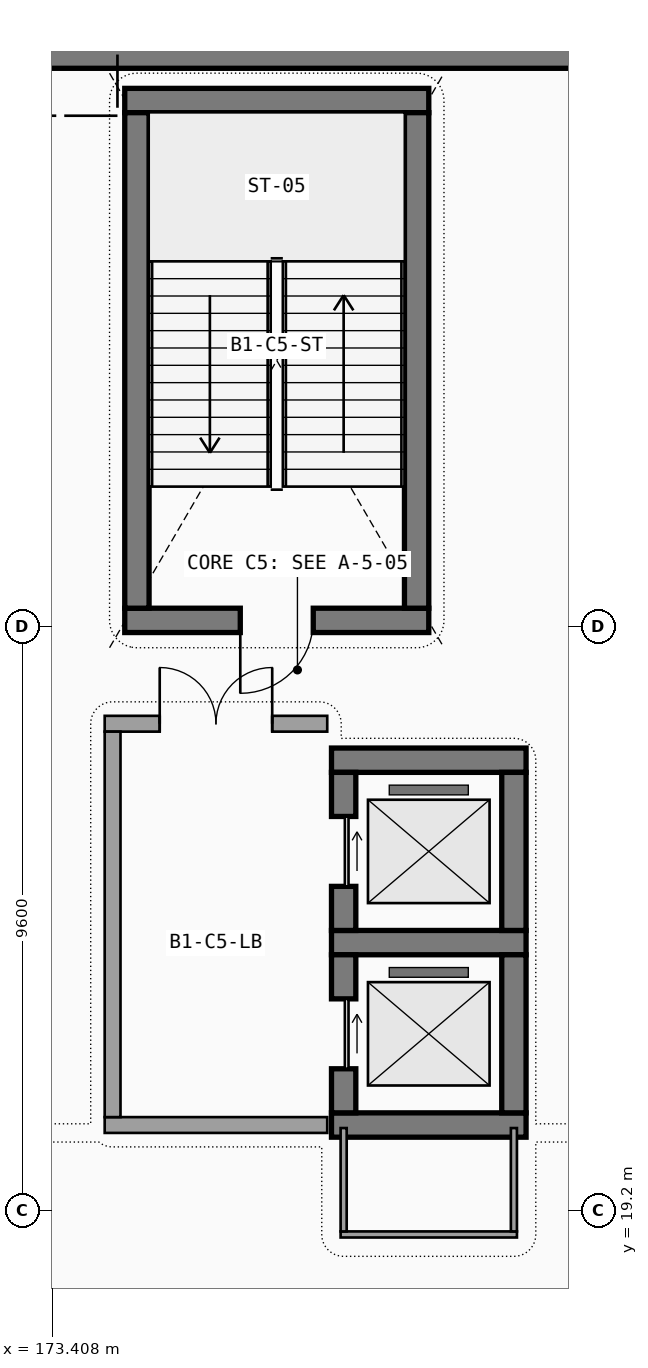
"""IFC4 building model, lengths in metres.
Left out: names, types, materials, properties, quantities, classifications, styles, units other than length and angle.
Written with IfcOpenShell. Run it as: python <this file> out.ifc"""

import sys

from ifc_helpers import new_model, si_unit, direction, frame, frame_2d, origin, place, context, subcontext, project, spatial, rectangle, extrude, element, fill, save


model = new_model("IFC4")
c1 = context("Model", 3, precision=1e-05, world=origin(), true_north=direction((0.0, 1.0)))
c2 = subcontext(c1, "Body", "Model", "MODEL_VIEW")
j1 = project(units=[si_unit("LENGTHUNIT", "METRE"), si_unit("PLANEANGLEUNIT", "RADIAN")], contexts=[c1])
p1 = place(None, origin())
s1 = spatial("IfcSite", under=j1, at=p1, CompositionType="ELEMENT")
p2 = place(p1, origin())
s2 = spatial("IfcBuilding", under=s1, at=p2, CompositionType="ELEMENT")
p3 = place(p2, frame((0.0, 0.0, -4.8)))
s3 = spatial("IfcBuildingStorey", under=s2, at=p3, CompositionType="ELEMENT", Elevation=-4.8)
p4 = place(p3, frame((182.4, 38.22, 0.0), z_axis=(0.0, 0.0, 1.0), x_axis=(-1.0, 0.0, 0.0)))
e1 = element("IfcWall", 1, at=p4, inside=s3, PredefinedType="USERDEFINED", context=c2, shape_type="SweptSolid", body=[
    extrude(rectangle(XDim=9.6, YDim=0.48, at=frame_2d((4.8, 0.0))), origin(), (0.0, 0.0, 1.0), 3.6),
])
p5 = place(p3, frame((174.6, 28.9, 0.0), z_axis=(0.0, 0.0, 1.0), x_axis=(1.0, 0.0, 0.0)))
e2 = element("IfcWall", 2, at=p5, inside=s3, PredefinedType="SHEAR", context=c2, shape_type="SweptSolid", body=[
    extrude(rectangle(XDim=5.0, YDim=0.4, at=frame_2d((2.5, 0.0))), origin(), (0.0, 0.0, 1.0), 4.5),
])
p6 = place(p5, frame((3.1, 0.0, 0.0), z_axis=(0.0, 0.0, 1.0), x_axis=(-1.0, 0.0, 0.0)))
e3 = element("IfcOpeningElement", 3, at=p6, cuts=e2, PredefinedType="OPENING", context=c2, shape_type="SweptSolid", body=[
    extrude(rectangle(XDim=1.2, YDim=2.2, at=frame_2d((0.6, 1.1))), frame((0.0, 0.21, 0.0), z_axis=(0.0, -1.0, 0.0), x_axis=(1.0, 0.0, 0.0)), (0.0, 0.0, 1.0), 0.42),
])
p7 = place(p3, frame((179.6, 37.45, 0.0), z_axis=(0.0, 0.0, 1.0), x_axis=(-1.0, 0.0, 0.0)))
e4 = element("IfcWall", 4, at=p7, inside=s3, PredefinedType="SHEAR", context=c2, shape_type="SweptSolid", body=[
    extrude(rectangle(XDim=5.0, YDim=0.4, at=frame_2d((2.5, 0.0))), origin(), (0.0, 0.0, 1.0), 4.5),
])
for number, where, z_axis, x_axis in (
    (5, (174.8, 37.25, 0.0), (0.0, 0.0, 1.0), (0.0, -1.0, 0.0)),
    (6, (179.4, 29.1, 0.0), (0.0, 0.0, 1.0), (0.0, 1.0, 0.0)),
):
    element("IfcWall", number, at=place(p3, frame(where, z_axis=z_axis, x_axis=x_axis)), inside=s3, PredefinedType="SHEAR", context=c2, shape_type="SweptSolid", body=[
        extrude(rectangle(XDim=8.15, YDim=0.4, at=frame_2d((4.075, 0.0))), origin(), (0.0, 0.0, 1.0), 4.5),
    ])
for number, where, z_axis, x_axis in (
    (7, (178.0, 20.6, 0.0), (0.0, 0.0, 1.0), (1.0, 0.0, 0.0)),
    (8, (181.2, 23.6, 0.0), (0.0, 0.0, 1.0), (-1.0, 0.0, 0.0)),
):
    element("IfcWall", number, at=place(p3, frame(where, z_axis=z_axis, x_axis=x_axis)), inside=s3, PredefinedType="SHEAR", context=c2, shape_type="SweptSolid", body=[
        extrude(rectangle(XDim=3.2, YDim=0.4, at=frame_2d((1.6, 0.0))), origin(), (0.0, 0.0, 1.0), 4.5),
    ])
p8 = place(p3, frame((178.2, 23.4, 0.0), z_axis=(0.0, 0.0, 1.0), x_axis=(0.0, -1.0, 0.0)))
e9 = element("IfcWall", 9, at=p8, inside=s3, PredefinedType="SHEAR", context=c2, shape_type="SweptSolid", body=[
    extrude(rectangle(XDim=2.6, YDim=0.4, at=frame_2d((1.3, 0.0))), origin(), (0.0, 0.0, 1.0), 4.5),
])
p9 = place(p8, frame((0.725, 0.0, 0.0), z_axis=(0.0, 0.0, 1.0), x_axis=(1.0, 0.0, 0.0)))
e10 = element("IfcOpeningElement", 10, at=p9, cuts=e9, PredefinedType="OPENING", context=c2, shape_type="SweptSolid", body=[
    extrude(rectangle(XDim=1.15, YDim=2.2, at=frame_2d((0.575, 1.1))), frame((0.0, 0.21, 0.0), z_axis=(0.0, -1.0, 0.0), x_axis=(1.0, 0.0, 0.0)), (0.0, 0.0, 1.0), 0.42),
])
p10 = place(p3, frame((181.0, 20.8, 0.0), z_axis=(0.0, 0.0, 1.0), x_axis=(0.0, 1.0, 0.0)))
e11 = element("IfcWall", 11, at=p10, inside=s3, PredefinedType="SHEAR", context=c2, shape_type="SweptSolid", body=[
    extrude(rectangle(XDim=2.6, YDim=0.4, at=frame_2d((1.3, 0.0))), origin(), (0.0, 0.0, 1.0), 4.5),
])
p11 = place(p3, frame((181.2, 26.6, 0.0), z_axis=(0.0, 0.0, 1.0), x_axis=(-1.0, 0.0, 0.0)))
e12 = element("IfcWall", 12, at=p11, inside=s3, PredefinedType="SHEAR", context=c2, shape_type="SweptSolid", body=[
    extrude(rectangle(XDim=3.2, YDim=0.4, at=frame_2d((1.6, 0.0))), origin(), (0.0, 0.0, 1.0), 4.5),
])
p12 = place(p3, frame((178.2, 26.4, 0.0), z_axis=(0.0, 0.0, 1.0), x_axis=(0.0, -1.0, 0.0)))
e13 = element("IfcWall", 13, at=p12, inside=s3, PredefinedType="SHEAR", context=c2, shape_type="SweptSolid", body=[
    extrude(rectangle(XDim=2.6, YDim=0.4, at=frame_2d((1.3, 0.0))), origin(), (0.0, 0.0, 1.0), 4.5),
])
p13 = place(p12, frame((0.725, 0.0, 0.0), z_axis=(0.0, 0.0, 1.0), x_axis=(1.0, 0.0, 0.0)))
e14 = element("IfcOpeningElement", 14, at=p13, cuts=e13, PredefinedType="OPENING", context=c2, shape_type="SweptSolid", body=[
    extrude(rectangle(XDim=1.15, YDim=2.2, at=frame_2d((0.575, 1.1))), frame((0.0, 0.21, 0.0), z_axis=(0.0, -1.0, 0.0), x_axis=(1.0, 0.0, 0.0)), (0.0, 0.0, 1.0), 0.42),
])
p14 = place(p3, frame((181.0, 23.8, 0.0), z_axis=(0.0, 0.0, 1.0), x_axis=(0.0, 1.0, 0.0)))
e15 = element("IfcWall", 15, at=p14, inside=s3, PredefinedType="SHEAR", context=c2, shape_type="SweptSolid", body=[
    extrude(rectangle(XDim=2.6, YDim=0.4, at=frame_2d((1.3, 0.0))), origin(), (0.0, 0.0, 1.0), 4.5),
])
p15 = place(p3, frame((178.15, 18.8, 0.0), z_axis=(0.0, 0.0, 1.0), x_axis=(1.0, 0.0, 0.0)))
e16 = element("IfcWall", 16, at=p15, inside=s3, PredefinedType="PARTITIONING", context=c2, shape_type="SweptSolid", body=[
    extrude(rectangle(XDim=2.9, YDim=0.1, at=frame_2d((1.45, 0.0))), origin(), (0.0, 0.0, 1.0), 4.5),
])
for number, where, z_axis, x_axis in (
    (17, (178.2, 20.55, 0.0), (0.0, 0.0, 1.0), (0.0, -1.0, 0.0)),
    (18, (181.0, 18.85, 0.0), (0.0, 0.0, 1.0), (0.0, 1.0, 0.0)),
):
    element("IfcWall", number, at=place(p3, frame(where, z_axis=z_axis, x_axis=x_axis)), inside=s3, PredefinedType="PARTITIONING", context=c2, shape_type="SweptSolid", body=[
        extrude(rectangle(XDim=1.7, YDim=0.1, at=frame_2d((0.85, 0.0))), origin(), (0.0, 0.0, 1.0), 4.5),
    ])
p16 = place(p3, frame((174.27, 20.6, 0.0), z_axis=(0.0, 0.0, 1.0), x_axis=(1.0, 0.0, 0.0)))
e19 = element("IfcWall", 19, at=p16, inside=s3, PredefinedType="SOLIDWALL", context=c2, shape_type="SweptSolid", body=[
    extrude(rectangle(XDim=3.66, YDim=0.26, at=frame_2d((1.83, 0.0))), origin(), (0.0, 0.0, 1.0), 4.5),
])
p17 = place(p3, frame((177.93, 27.2, 0.0), z_axis=(0.0, 0.0, 1.0), x_axis=(-1.0, 0.0, 0.0)))
e20 = element("IfcWall", 20, at=p17, inside=s3, PredefinedType="SOLIDWALL", context=c2, shape_type="SweptSolid", body=[
    extrude(rectangle(XDim=3.66, YDim=0.26, at=frame_2d((1.83, 0.0))), origin(), (0.0, 0.0, 1.0), 4.5),
])
p18 = place(p17, frame((2.755, 0.0, 0.0), z_axis=(0.0, 0.0, 1.0), x_axis=(-1.0, 0.0, 0.0)))
e21 = element("IfcOpeningElement", 21, at=p18, cuts=e20, PredefinedType="OPENING", context=c2, shape_type="SweptSolid", body=[
    extrude(rectangle(XDim=1.85, YDim=2.25, at=frame_2d((0.925, 1.125))), frame((0.0, 0.14, 0.0), z_axis=(0.0, -1.0, 0.0), x_axis=(1.0, 0.0, 0.0)), (0.0, 0.0, 1.0), 0.28),
])
p19 = place(p3, frame((174.4, 27.07, 0.0), z_axis=(0.0, 0.0, 1.0), x_axis=(0.0, -1.0, 0.0)))
e22 = element("IfcWall", 22, at=p19, inside=s3, PredefinedType="SOLIDWALL", context=c2, shape_type="SweptSolid", body=[
    extrude(rectangle(XDim=6.34, YDim=0.26, at=frame_2d((3.17, 0.0))), origin(), (0.0, 0.0, 1.0), 4.5),
])
p20 = place(p6, origin())
e23 = element("IfcDoor", 23, at=p20, inside=s3, OperationType="SINGLE_SWING_RIGHT", PredefinedType="DOOR", context=c2, shape_type="SweptSolid", body=[
    extrude(rectangle(XDim=1.2, YDim=2.2, at=frame_2d((0.6, 1.1))), frame((0.0, 0.025, 0.0), z_axis=(0.0, -1.0, 0.0), x_axis=(1.0, 0.0, 0.0)), (0.0, 0.0, 1.0), 0.05),
])
fill(e3, e23)
p21 = place(p9, origin())
e24 = element("IfcDoor", 24, at=p21, inside=s3, OperationType="SLIDING_TO_LEFT", PredefinedType="DOOR", context=c2, shape_type="SweptSolid", body=[
    extrude(rectangle(XDim=1.15, YDim=2.2, at=frame_2d((0.575, 1.1))), frame((0.0, 0.025, 0.0), z_axis=(0.0, -1.0, 0.0), x_axis=(1.0, 0.0, 0.0)), (0.0, 0.0, 1.0), 0.05),
])
fill(e10, e24)
p22 = place(p13, origin())
e25 = element("IfcDoor", 25, at=p22, inside=s3, OperationType="SLIDING_TO_LEFT", PredefinedType="DOOR", context=c2, shape_type="SweptSolid", body=[
    extrude(rectangle(XDim=1.15, YDim=2.2, at=frame_2d((0.575, 1.1))), frame((0.0, 0.025, 0.0), z_axis=(0.0, -1.0, 0.0), x_axis=(1.0, 0.0, 0.0)), (0.0, 0.0, 1.0), 0.05),
])
fill(e14, e25)
p23 = place(p18, origin())
e26 = element("IfcDoor", 26, at=p23, inside=s3, OperationType="DOUBLE_DOOR_SINGLE_SWING", PredefinedType="DOOR", context=c2, shape_type="SweptSolid", body=[
    extrude(rectangle(XDim=1.85, YDim=2.25, at=frame_2d((0.925, 1.125))), frame((0.0, 0.025, 0.0), z_axis=(0.0, -1.0, 0.0), x_axis=(1.0, 0.0, 0.0)), (0.0, 0.0, 1.0), 0.05),
])
fill(e21, e26)
save(model, sys.argv[1])
